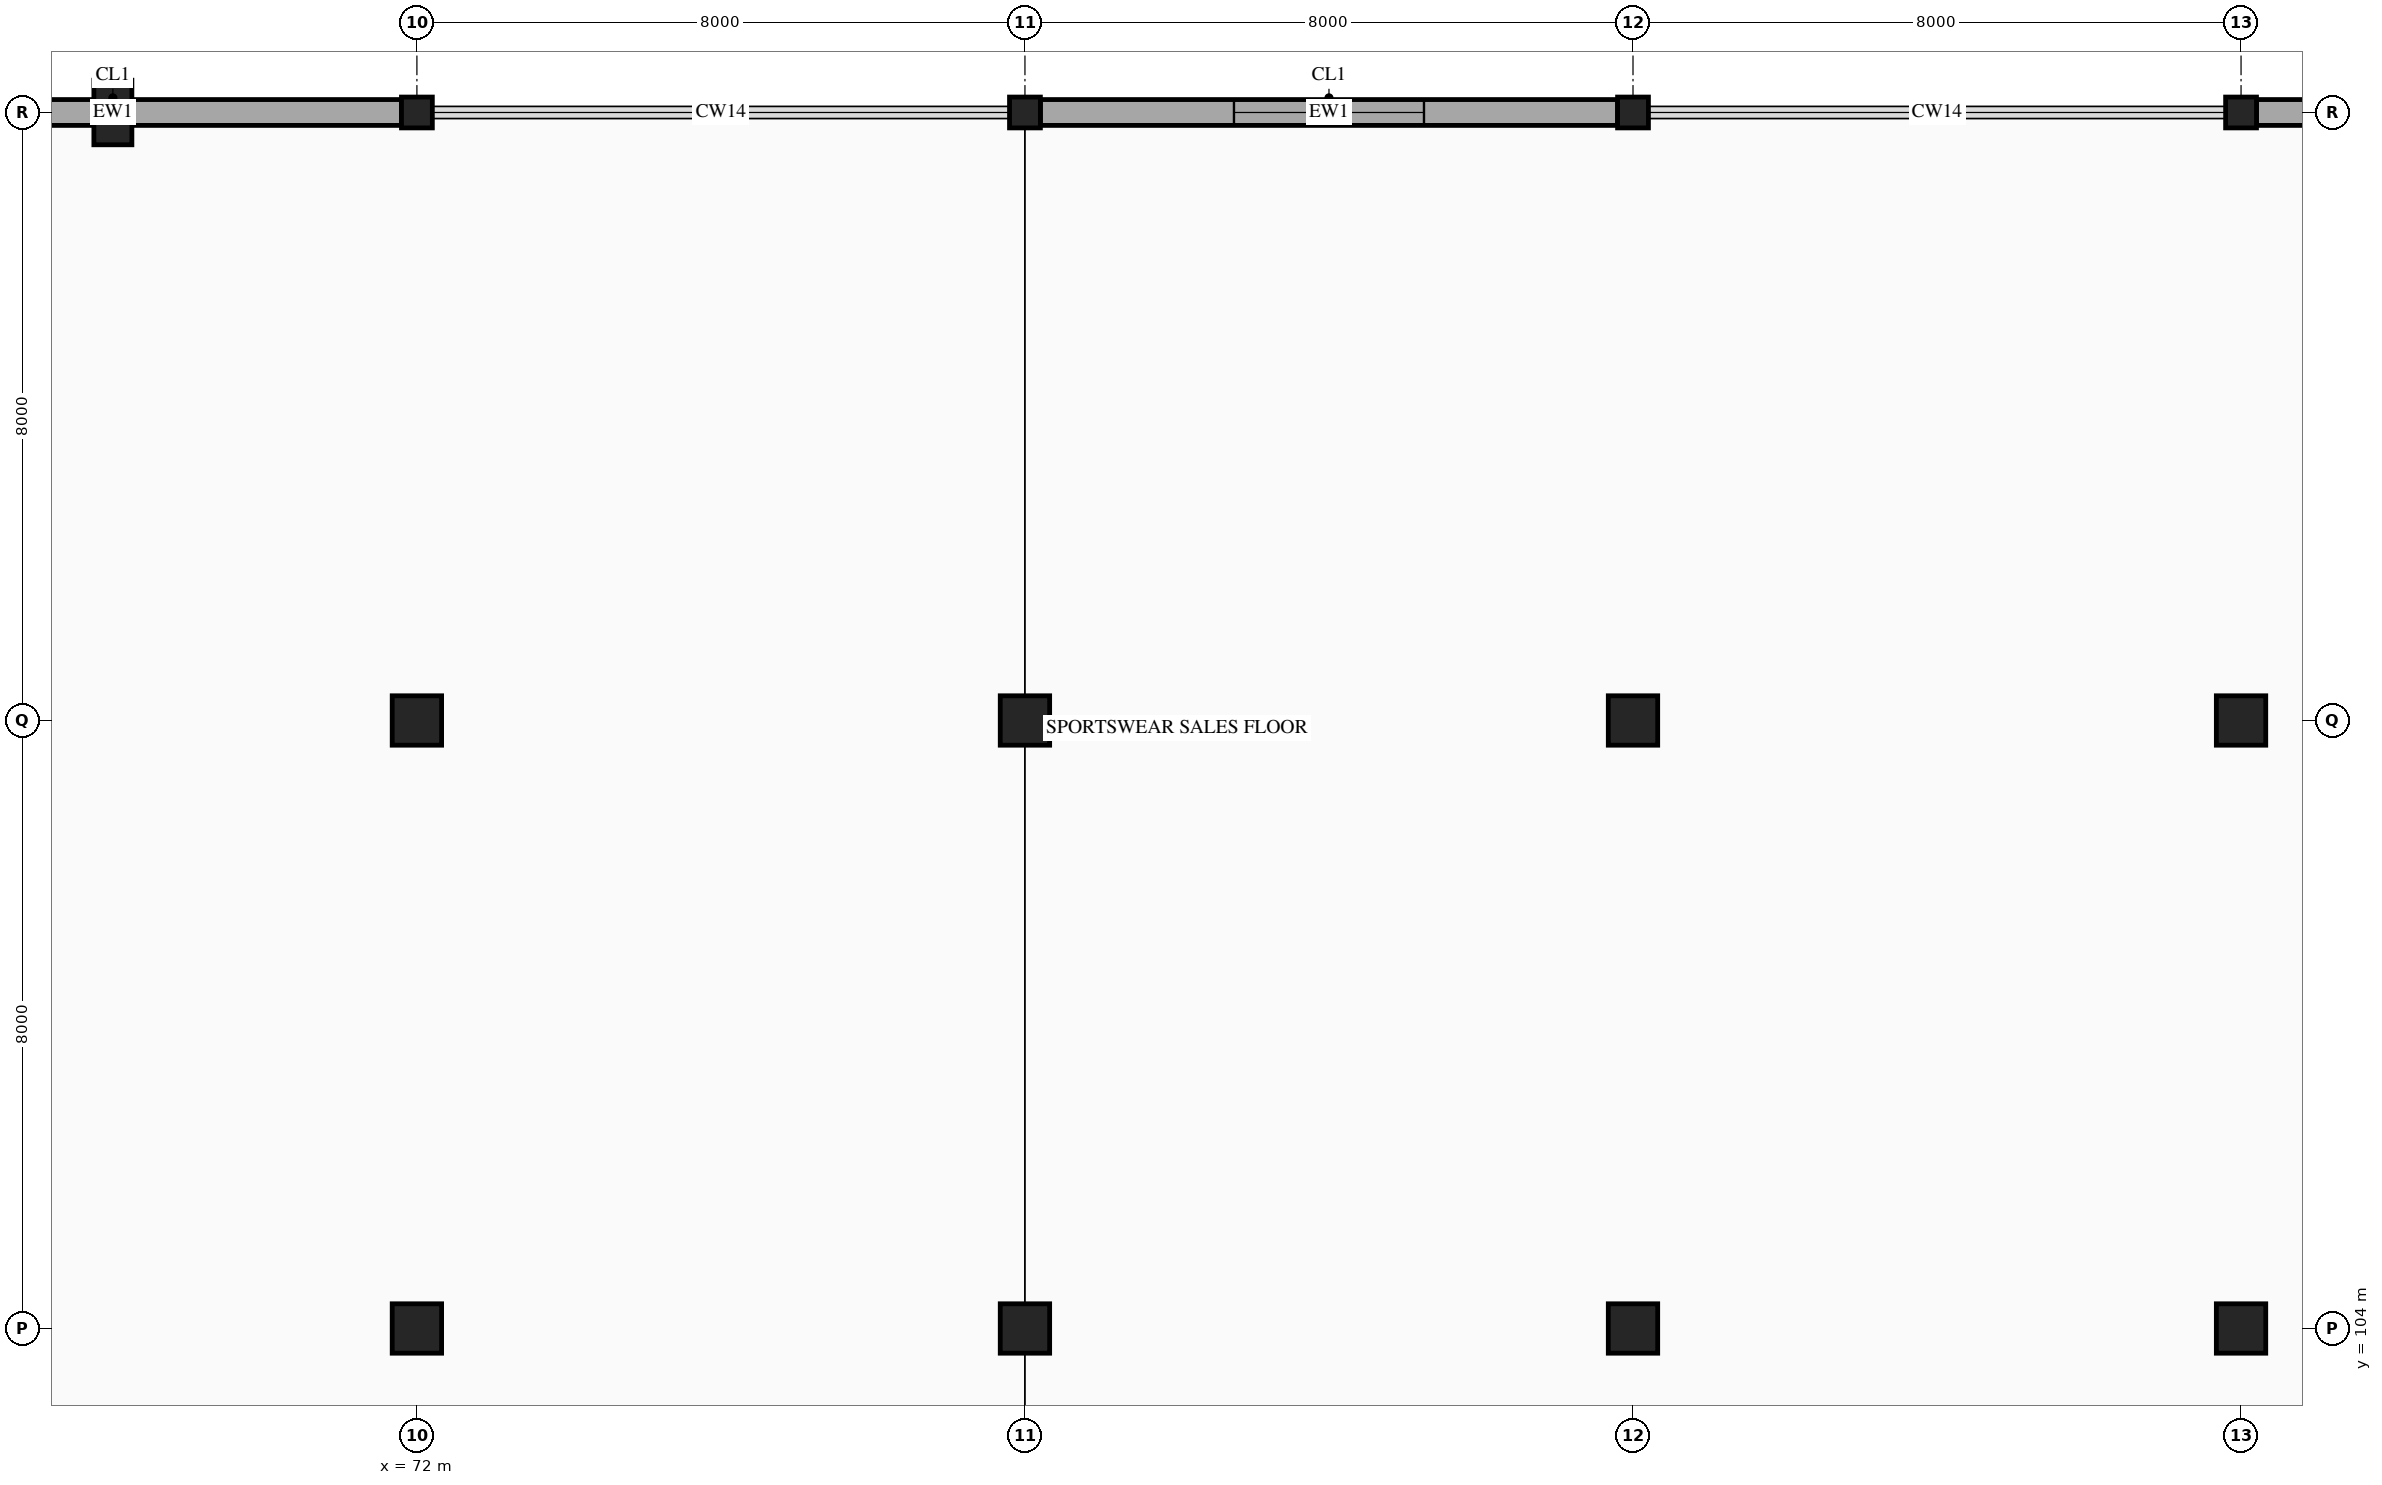
"""IFC4 building model, lengths in metres.
Left out: names, types, materials, properties, quantities, classifications, styles, units other than length and angle.
Written with IfcOpenShell. Run it as: python <this file> out.ifc"""

import sys

from ifc_helpers import new_model, si_unit, direction, frame, frame_2d, origin, origin_2d, place, context, subcontext, project, spatial, rectangle, hollow_rectangle, extrude, element, fill, save


model = new_model("IFC4")
c1 = context("Model", 3, precision=1e-05, world=origin(), true_north=direction((0.0, 1.0)))
c2 = subcontext(c1, "Body", "Model", "MODEL_VIEW")
j1 = project(units=[si_unit("LENGTHUNIT", "METRE"), si_unit("PLANEANGLEUNIT", "RADIAN")], contexts=[c1])
p1 = place(None, origin())
s1 = spatial("IfcSite", under=j1, at=p1, CompositionType="ELEMENT")
p2 = place(p1, origin())
s2 = spatial("IfcBuilding", under=s1, at=p2, CompositionType="ELEMENT")
p3 = place(p2, frame((0.0, 0.0, 5.6)))
s3 = spatial("IfcBuildingStorey", under=s2, at=p3, CompositionType="ELEMENT", Elevation=5.6)
for number, where, z_axis, x_axis in (
    (1, (72.0, 104.0, 0.0), (0.0, 0.0, 1.0), (1.0, 0.0, 0.0)),
    (2, (72.0, 112.0, 0.0), (0.0, 0.0, 1.0), (1.0, 0.0, 0.0)),
):
    element("IfcColumn", number, at=place(p3, frame(where, z_axis=z_axis, x_axis=x_axis)), inside=s3, PredefinedType="COLUMN", context=c2, shape_type="SweptSolid", body=[
        extrude(rectangle(XDim=0.65, YDim=0.65, at=origin_2d()), origin(), (0.0, 0.0, 1.0), 4.8),
    ])
p4 = place(p3, frame((72.0, 120.0, 0.0), z_axis=(0.0, 0.0, 1.0), x_axis=(1.0, 0.0, 0.0)))
e3 = element("IfcColumn", 3, at=p4, inside=s3, PredefinedType="COLUMN", context=c2, shape_type="SweptSolid", body=[
    extrude(hollow_rectangle(XDim=0.406, YDim=0.406, WallThickness=0.015, InnerFilletRadius=0.015, OuterFilletRadius=0.029, at=origin_2d()), origin(), (0.0, 0.0, 1.0), 4.8),
])
for number, where, z_axis, x_axis in (
    (4, (80.0, 104.0, 0.0), (0.0, 0.0, 1.0), (1.0, 0.0, 0.0)),
    (5, (80.0, 112.0, 0.0), (0.0, 0.0, 1.0), (1.0, 0.0, 0.0)),
):
    element("IfcColumn", number, at=place(p3, frame(where, z_axis=z_axis, x_axis=x_axis)), inside=s3, PredefinedType="COLUMN", context=c2, shape_type="SweptSolid", body=[
        extrude(rectangle(XDim=0.65, YDim=0.65, at=origin_2d()), origin(), (0.0, 0.0, 1.0), 4.8),
    ])
p5 = place(p3, frame((80.0, 120.0, 0.0), z_axis=(0.0, 0.0, 1.0), x_axis=(1.0, 0.0, 0.0)))
e6 = element("IfcColumn", 6, at=p5, inside=s3, PredefinedType="COLUMN", context=c2, shape_type="SweptSolid", body=[
    extrude(hollow_rectangle(XDim=0.406, YDim=0.406, WallThickness=0.015, InnerFilletRadius=0.015, OuterFilletRadius=0.029, at=origin_2d()), origin(), (0.0, 0.0, 1.0), 4.8),
])
for number, where, z_axis, x_axis in (
    (7, (88.0, 104.0, 0.0), (0.0, 0.0, 1.0), (1.0, 0.0, 0.0)),
    (8, (88.0, 112.0, 0.0), (0.0, 0.0, 1.0), (1.0, 0.0, 0.0)),
):
    element("IfcColumn", number, at=place(p3, frame(where, z_axis=z_axis, x_axis=x_axis)), inside=s3, PredefinedType="COLUMN", context=c2, shape_type="SweptSolid", body=[
        extrude(rectangle(XDim=0.65, YDim=0.65, at=origin_2d()), origin(), (0.0, 0.0, 1.0), 4.8),
    ])
p6 = place(p3, frame((88.0, 120.0, 0.0), z_axis=(0.0, 0.0, 1.0), x_axis=(1.0, 0.0, 0.0)))
e9 = element("IfcColumn", 9, at=p6, inside=s3, PredefinedType="COLUMN", context=c2, shape_type="SweptSolid", body=[
    extrude(hollow_rectangle(XDim=0.406, YDim=0.406, WallThickness=0.015, InnerFilletRadius=0.015, OuterFilletRadius=0.029, at=origin_2d()), origin(), (0.0, 0.0, 1.0), 4.8),
])
for number, where, z_axis, x_axis in (
    (10, (96.0, 104.0, 0.0), (0.0, 0.0, 1.0), (1.0, 0.0, 0.0)),
    (11, (96.0, 112.0, 0.0), (0.0, 0.0, 1.0), (1.0, 0.0, 0.0)),
):
    element("IfcColumn", number, at=place(p3, frame(where, z_axis=z_axis, x_axis=x_axis)), inside=s3, PredefinedType="COLUMN", context=c2, shape_type="SweptSolid", body=[
        extrude(rectangle(XDim=0.65, YDim=0.65, at=origin_2d()), origin(), (0.0, 0.0, 1.0), 4.8),
    ])
p7 = place(p3, frame((96.0, 120.0, 0.0), z_axis=(0.0, 0.0, 1.0), x_axis=(1.0, 0.0, 0.0)))
e12 = element("IfcColumn", 12, at=p7, inside=s3, PredefinedType="COLUMN", context=c2, shape_type="SweptSolid", body=[
    extrude(hollow_rectangle(XDim=0.406, YDim=0.406, WallThickness=0.015, InnerFilletRadius=0.015, OuterFilletRadius=0.029, at=origin_2d()), origin(), (0.0, 0.0, 1.0), 4.8),
])
p8 = place(p3, frame((68.0, 120.0, 0.0), z_axis=(0.0, 0.0, 1.0), x_axis=(1.0, 0.0, 0.0)))
e13 = element("IfcColumn", 13, at=p8, inside=s3, PredefinedType="PILASTER", context=c2, shape_type="SweptSolid", body=[
    extrude(rectangle(XDim=0.5, YDim=0.85, at=origin_2d()), origin(), (0.0, 0.0, 1.0), 4.8),
])
p9 = place(p3, frame((64.203, 120.0, 0.0), z_axis=(0.0, 0.0, 1.0), x_axis=(1.0, 0.0, 0.0)))
e14 = element("IfcWall", 14, at=p9, inside=s3, PredefinedType="STANDARD", context=c2, shape_type="SweptSolid", body=[
    extrude(rectangle(XDim=7.594, YDim=0.34, at=frame_2d((3.797, 0.0))), origin(), (0.0, 0.0, 1.0), 3.78),
])
p10 = place(p3, frame((80.203, 120.0, 0.0), z_axis=(0.0, 0.0, 1.0), x_axis=(1.0, 0.0, 0.0)))
e15 = element("IfcWall", 15, at=p10, inside=s3, PredefinedType="STANDARD", context=c2, shape_type="SweptSolid", body=[
    extrude(rectangle(XDim=7.594, YDim=0.34, at=frame_2d((3.797, 0.0))), origin(), (0.0, 0.0, 1.0), 3.78),
])
p11 = place(p10, frame((2.547, 0.0, 0.8)))
e16 = element("IfcOpeningElement", 16, at=p11, cuts=e15, PredefinedType="OPENING", context=c2, shape_type="SweptSolid", body=[
    extrude(rectangle(XDim=2.5, YDim=2.25, at=frame_2d((1.25, 1.125))), frame((0.0, 0.18, 0.0), z_axis=(0.0, -1.0, 0.0), x_axis=(1.0, 0.0, 0.0)), (0.0, 0.0, 1.0), 0.36),
])
p12 = place(p3, frame((96.203, 120.0, 0.0), z_axis=(0.0, 0.0, 1.0), x_axis=(1.0, 0.0, 0.0)))
e17 = element("IfcWall", 17, at=p12, inside=s3, PredefinedType="STANDARD", context=c2, shape_type="SweptSolid", body=[
    extrude(rectangle(XDim=7.594, YDim=0.34, at=frame_2d((3.797, 0.0))), origin(), (0.0, 0.0, 1.0), 3.78),
])
p13 = place(p11, origin())
e18 = element("IfcWindow", 18, at=p13, inside=s3, PartitioningType="DOUBLE_PANEL_VERTICAL", PredefinedType="WINDOW", context=c2, shape_type="SweptSolid", body=[
    extrude(rectangle(XDim=2.5, YDim=2.25, at=frame_2d((1.25, 1.125))), frame((0.0, 0.03, 0.0), z_axis=(0.0, -1.0, 0.0), x_axis=(1.0, 0.0, 0.0)), (0.0, 0.0, 1.0), 0.06),
])
fill(e16, e18)
save(model, sys.argv[1])
